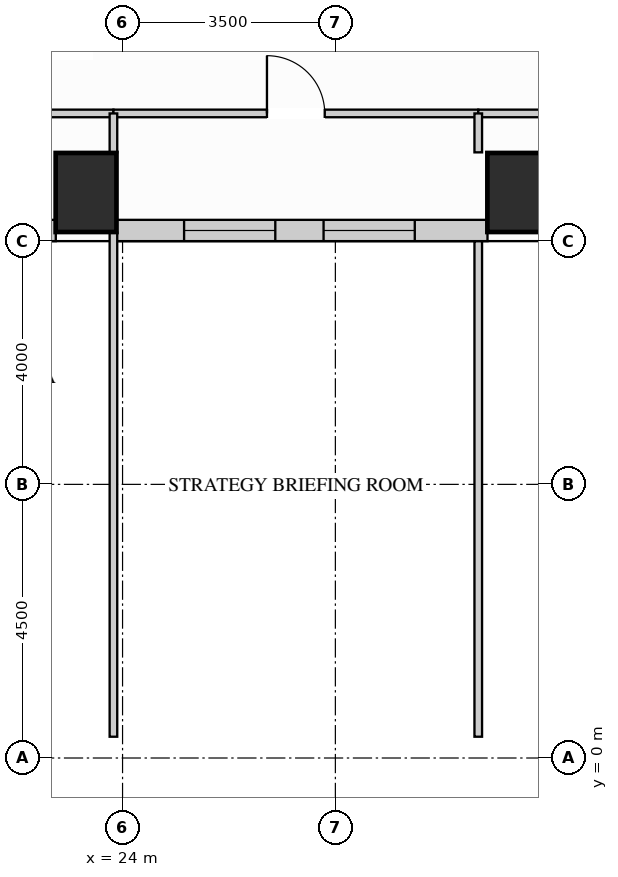
"""IFC4 building model, lengths in metres.
Left out: names, types, materials, properties, quantities, classifications, styles, units other than length and angle.
Written with IfcOpenShell. Run it as: python <this file> out.ifc"""

import sys

from ifc_helpers import new_model, si_unit, direction, frame, frame_2d, origin, origin_2d, place, context, subcontext, project, spatial, rectangle, extrude, source, transform, mapped, element, fill, save


model = new_model("IFC4")
c1 = context("Model", 3, precision=1e-05, world=origin(), true_north=direction((0.0, 1.0)))
c2 = subcontext(c1, "Body", "Model", "MODEL_VIEW")
j1 = project(units=[si_unit("LENGTHUNIT", "METRE"), si_unit("PLANEANGLEUNIT", "RADIAN")], contexts=[c1])
p1 = place(None, origin())
s1 = spatial("IfcSite", under=j1, at=p1, CompositionType="ELEMENT")
p2 = place(p1, origin())
s2 = spatial("IfcBuilding", under=s1, at=p2, CompositionType="ELEMENT")
p3 = place(p2, frame((0.0, 0.0, 69.3)))
s3 = spatial("IfcBuildingStorey", under=s2, at=p3, CompositionType="ELEMENT", Elevation=69.3)
m1 = source(origin(), c2, "Body", "SweptSolid", [
    extrude(rectangle(XDim=1.0, YDim=1.3, at=origin_2d()), origin(), (0.0, 0.0, 1.0), 3.32),
])
for number, where, z_axis, x_axis in (
    (1, (23.4, 9.3, 0.0), (0.0, 0.0, 1.0), (1.0, 0.0, 0.0)),
    (2, (30.5, 9.3, 0.0), (0.0, 0.0, 1.0), (1.0, 0.0, 0.0)),
):
    element("IfcColumn", number, at=place(p3, frame(where, z_axis=z_axis, x_axis=x_axis)), inside=s3, PredefinedType="COLUMN", context=c2, shape_type="MappedRepresentation", body=[
        mapped(m1, transform((0.0, 0.0, 0.0), x_axis=(1.0, 0.0, 0.0), y_axis=(0.0, 1.0, 0.0), z_axis=(0.0, 0.0, 1.0))),
    ])
p4 = place(p3, frame((19.498, 8.675, 0.0), z_axis=(0.0, 0.0, 1.0), x_axis=(1.0, 0.0, 0.0)))
e3 = element("IfcWall", 3, at=p4, inside=s3, PredefinedType="SOLIDWALL", context=c2, shape_type="SweptSolid", body=[
    extrude(rectangle(XDim=3.404, YDim=0.35, at=frame_2d((1.702, 0.0))), origin(), (0.0, 0.0, 1.0), 3.305),
])
p5 = place(p4, frame((0.952, 0.0, 0.78)))
e4 = element("IfcOpeningElement", 4, at=p5, cuts=e3, PredefinedType="OPENING", context=c2, shape_type="SweptSolid", body=[
    extrude(rectangle(XDim=1.5, YDim=2.0, at=frame_2d((0.75, 1.0))), frame((0.0, 0.185, 0.0), z_axis=(0.0, -1.0, 0.0), x_axis=(1.0, 0.0, 0.0)), (0.0, 0.0, 1.0), 0.37),
])
p6 = place(p3, frame((23.898, 8.675, 0.0), z_axis=(0.0, 0.0, 1.0), x_axis=(1.0, 0.0, 0.0)))
e5 = element("IfcWall", 5, at=p6, inside=s3, PredefinedType="SOLIDWALL", context=c2, shape_type="SweptSolid", body=[
    extrude(rectangle(XDim=6.104, YDim=0.35, at=frame_2d((3.052, 0.0))), origin(), (0.0, 0.0, 1.0), 3.305),
])
p7 = place(p6, frame((1.114, 0.0, 0.78)))
e6 = element("IfcOpeningElement", 6, at=p7, cuts=e5, PredefinedType="OPENING", context=c2, shape_type="SweptSolid", body=[
    extrude(rectangle(XDim=1.5, YDim=2.0, at=frame_2d((0.75, 1.0))), frame((0.0, 0.185, 0.0), z_axis=(0.0, -1.0, 0.0), x_axis=(1.0, 0.0, 0.0)), (0.0, 0.0, 1.0), 0.37),
])
p8 = place(p6, frame((3.408, 0.0, 0.78)))
e7 = element("IfcOpeningElement", 7, at=p8, cuts=e5, PredefinedType="OPENING", context=c2, shape_type="SweptSolid", body=[
    extrude(rectangle(XDim=1.5, YDim=2.0, at=frame_2d((0.75, 1.0))), frame((0.0, 0.185, 0.0), z_axis=(0.0, -1.0, 0.0), x_axis=(1.0, 0.0, 0.0)), (0.0, 0.0, 1.0), 0.37),
])
p9 = place(p3, frame((19.5, 10.6, 0.0), z_axis=(0.0, 0.0, 1.0), x_axis=(1.0, 0.0, 0.0)))
e8 = element("IfcWall", 8, at=p9, inside=s3, PredefinedType="PARTITIONING", context=c2, shape_type="SweptSolid", body=[
    extrude(rectangle(XDim=4.35, YDim=0.125, at=frame_2d((2.175, 0.0))), origin(), (0.0, 0.0, 1.0), 3.305),
])
p10 = place(p9, frame((1.7, 0.0, 0.0)))
e9 = element("IfcOpeningElement", 9, at=p10, cuts=e8, PredefinedType="OPENING", context=c2, shape_type="SweptSolid", body=[
    extrude(rectangle(XDim=0.95, YDim=2.15, at=frame_2d((0.475, 1.075))), frame((0.0, 0.073, 0.0), z_axis=(0.0, -1.0, 0.0), x_axis=(1.0, 0.0, 0.0)), (0.0, 0.0, 1.0), 0.145),
])
p11 = place(p3, frame((23.85, 10.6, 0.0), z_axis=(0.0, 0.0, 1.0), x_axis=(1.0, 0.0, 0.0)))
e10 = element("IfcWall", 10, at=p11, inside=s3, PredefinedType="PARTITIONING", context=c2, shape_type="SweptSolid", body=[
    extrude(rectangle(XDim=6.0, YDim=0.125, at=frame_2d((3.0, 0.0))), origin(), (0.0, 0.0, 1.0), 3.305),
])
p12 = place(p11, frame((2.525, 0.0, 0.0)))
e11 = element("IfcOpeningElement", 11, at=p12, cuts=e10, PredefinedType="OPENING", context=c2, shape_type="SweptSolid", body=[
    extrude(rectangle(XDim=0.95, YDim=2.15, at=frame_2d((0.475, 1.075))), frame((0.0, 0.073, 0.0), z_axis=(0.0, -1.0, 0.0), x_axis=(1.0, 0.0, 0.0)), (0.0, 0.0, 1.0), 0.145),
])
p13 = place(p3, frame((29.85, 10.6, 0.0), z_axis=(0.0, 0.0, 1.0), x_axis=(1.0, 0.0, 0.0)))
e12 = element("IfcWall", 12, at=p13, inside=s3, PredefinedType="PARTITIONING", context=c2, shape_type="SweptSolid", body=[
    extrude(rectangle(XDim=4.55, YDim=0.125, at=frame_2d((2.275, 0.0))), origin(), (0.0, 0.0, 1.0), 3.305),
])
p14 = place(p13, frame((1.8, 0.0, 0.0)))
e13 = element("IfcOpeningElement", 13, at=p14, cuts=e12, PredefinedType="OPENING", context=c2, shape_type="SweptSolid", body=[
    extrude(rectangle(XDim=0.95, YDim=2.15, at=frame_2d((0.475, 1.075))), frame((0.0, 0.073, 0.0), z_axis=(0.0, -1.0, 0.0), x_axis=(1.0, 0.0, 0.0)), (0.0, 0.0, 1.0), 0.145),
])
m2 = source(origin(), c2, "Body", "SweptSolid", [
    extrude(rectangle(XDim=8.29, YDim=0.125, at=frame_2d((4.145, 0.0))), origin(), (0.0, 0.0, 1.0), 3.305),
])
p15 = place(p3, frame((23.85, 0.35, 0.0), z_axis=(0.0, 0.0, 1.0), x_axis=(0.0, 1.0, 0.0)))
e14 = element("IfcWall", 14, at=p15, inside=s3, PredefinedType="PARTITIONING", context=c2, shape_type="MappedRepresentation", body=[
    mapped(m2, transform((0.0, 0.0, 0.0), x_axis=(1.0, 0.0, 0.0), y_axis=(0.0, 1.0, 0.0), z_axis=(0.0, 0.0, 1.0))),
])
m3 = source(origin(), c2, "Body", "SweptSolid", [
    extrude(rectangle(XDim=0.64, YDim=0.125, at=frame_2d((0.32, 0.0))), origin(), (0.0, 0.0, 1.0), 3.305),
])
p16 = place(p3, frame((23.85, 9.96, 0.0), z_axis=(0.0, 0.0, 1.0), x_axis=(0.0, 1.0, 0.0)))
e15 = element("IfcWall", 15, at=p16, inside=s3, PredefinedType="PARTITIONING", context=c2, shape_type="MappedRepresentation", body=[
    mapped(m3, transform((0.0, 0.0, 0.0), x_axis=(1.0, 0.0, 0.0), y_axis=(0.0, 1.0, 0.0), z_axis=(0.0, 0.0, 1.0))),
])
m4 = source(origin(), c2, "Body", "SweptSolid", [
    extrude(rectangle(XDim=8.148, YDim=0.125, at=frame_2d((4.074, 0.0))), origin(), (0.0, 0.0, 1.0), 3.305),
])
p17 = place(p3, frame((29.85, 0.35, 0.0), z_axis=(0.0, 0.0, 1.0), x_axis=(0.0, 1.0, 0.0)))
e16 = element("IfcWall", 16, at=p17, inside=s3, PredefinedType="PARTITIONING", context=c2, shape_type="MappedRepresentation", body=[
    mapped(m4, transform((0.0, 0.0, 0.0), x_axis=(1.0, 0.0, 0.0), y_axis=(0.0, 1.0, 0.0), z_axis=(0.0, 0.0, 1.0))),
])
p18 = place(p3, frame((29.85, 9.96, 0.0), z_axis=(0.0, 0.0, 1.0), x_axis=(0.0, 1.0, 0.0)))
e17 = element("IfcWall", 17, at=p18, inside=s3, PredefinedType="PARTITIONING", context=c2, shape_type="MappedRepresentation", body=[
    mapped(m3, transform((0.0, 0.0, 0.0), x_axis=(1.0, 0.0, 0.0), y_axis=(0.0, 1.0, 0.0), z_axis=(0.0, 0.0, 1.0))),
])
m5 = source(origin(), c2, "Body", "SweptSolid", [
    extrude(rectangle(XDim=0.95, YDim=2.15, at=frame_2d((0.475, 1.075))), frame((0.0, 0.025, 0.0), z_axis=(0.0, -1.0, 0.0), x_axis=(1.0, 0.0, 0.0)), (0.0, 0.0, 1.0), 0.05),
])
p19 = place(p12, origin())
e18 = element("IfcDoor", 18, at=p19, inside=s3, OperationType="SINGLE_SWING_LEFT", PredefinedType="DOOR", context=c2, shape_type="MappedRepresentation", body=[
    mapped(m5, transform((0.0, 0.0, 0.0), x_axis=(1.0, 0.0, 0.0), y_axis=(0.0, 1.0, 0.0), z_axis=(0.0, 0.0, 1.0))),
])
fill(e11, e18)
m6 = source(origin(), c2, "Body", "SweptSolid", [
    extrude(rectangle(XDim=1.5, YDim=2.0, at=frame_2d((0.75, 1.0))), frame((0.0, 0.03, 0.0), z_axis=(0.0, -1.0, 0.0), x_axis=(1.0, 0.0, 0.0)), (0.0, 0.0, 1.0), 0.06),
])
p20 = place(p7, origin())
e19 = element("IfcWindow", 19, at=p20, inside=s3, PartitioningType="SINGLE_PANEL", PredefinedType="WINDOW", context=c2, shape_type="MappedRepresentation", body=[
    mapped(m6, transform((0.0, 0.0, 0.0), x_axis=(1.0, 0.0, 0.0), y_axis=(0.0, 1.0, 0.0), z_axis=(0.0, 0.0, 1.0))),
])
fill(e6, e19)
p21 = place(p8, origin())
e20 = element("IfcWindow", 20, at=p21, inside=s3, PartitioningType="SINGLE_PANEL", PredefinedType="WINDOW", context=c2, shape_type="MappedRepresentation", body=[
    mapped(m6, transform((0.0, 0.0, 0.0), x_axis=(1.0, 0.0, 0.0), y_axis=(0.0, 1.0, 0.0), z_axis=(0.0, 0.0, 1.0))),
])
fill(e7, e20)
save(model, sys.argv[1])
